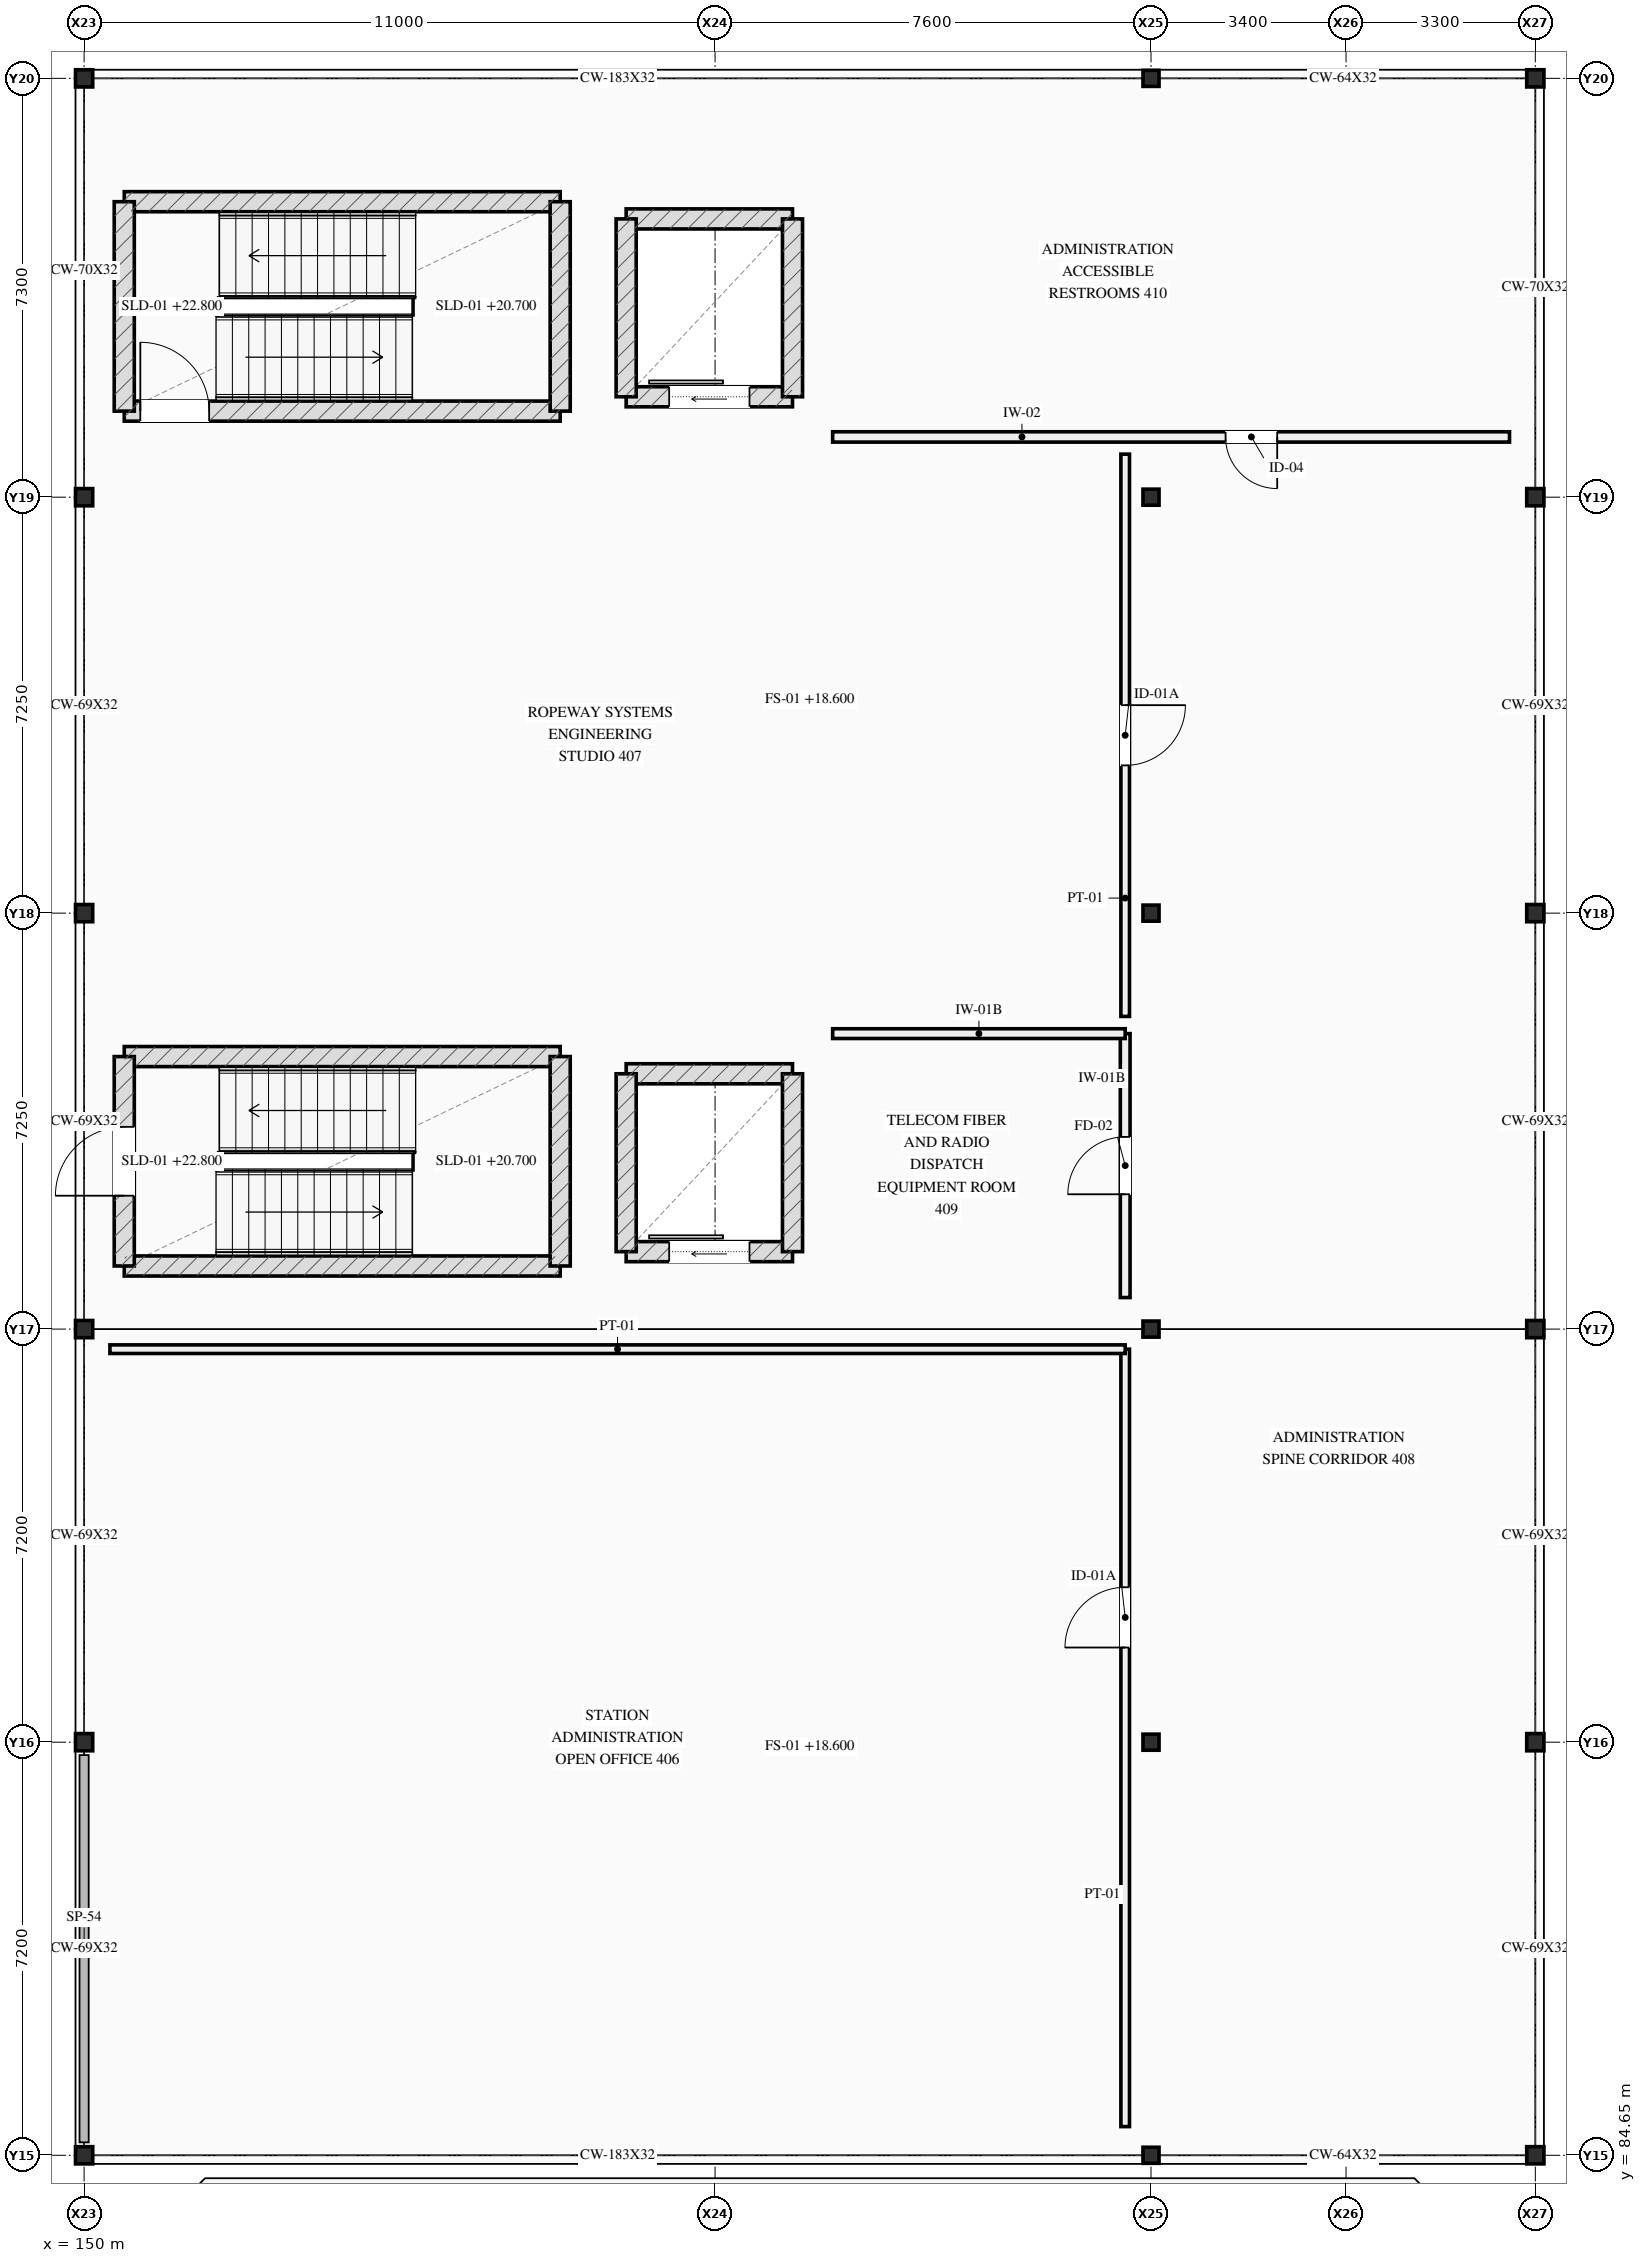
"""IFC4 building model, lengths in metres.
Left out: names, types, materials, properties, quantities, classifications, styles, units other than length and angle.
Written with IfcOpenShell. Run it as: python <this file> out.ifc"""

import sys

from ifc_helpers import new_model, si_unit, direction, frame, frame_2d, origin, origin_2d, place, context, subcontext, project, spatial, rectangle, hollow_rectangle, extrude, element, fill, save


model = new_model("IFC4")
c1 = context("Model", 3, precision=1e-05, world=origin(), true_north=direction((0.0, 1.0)))
c2 = subcontext(c1, "Body", "Model", "MODEL_VIEW")
j1 = project(units=[si_unit("LENGTHUNIT", "METRE"), si_unit("PLANEANGLEUNIT", "RADIAN")], contexts=[c1])
p1 = place(None, origin())
s1 = spatial("IfcSite", under=j1, at=p1, CompositionType="ELEMENT")
p2 = place(p1, origin())
s2 = spatial("IfcBuilding", under=s1, at=p2, CompositionType="ELEMENT")
p3 = place(p2, frame((0.0, 0.0, 18.6)))
s3 = spatial("IfcBuildingStorey", under=s2, at=p3, CompositionType="ELEMENT", Elevation=18.6)
for number, where, z_axis, x_axis in (
    (1, (150.0, 84.65, 0.0), (0.0, 0.0, 1.0), (1.0, 0.0, 0.0)),
    (2, (150.0, 91.85, 0.0), (0.0, 0.0, 1.0), (1.0, 0.0, 0.0)),
    (3, (150.0, 99.05, 0.0), (0.0, 0.0, 1.0), (1.0, 0.0, 0.0)),
    (4, (150.0, 106.3, 0.0), (0.0, 0.0, 1.0), (1.0, 0.0, 0.0)),
    (5, (150.0, 113.55, 0.0), (0.0, 0.0, 1.0), (1.0, 0.0, 0.0)),
    (6, (150.0, 120.85, 0.0), (0.0, 0.0, 1.0), (1.0, 0.0, 0.0)),
):
    element("IfcColumn", number, at=place(p3, frame(where, z_axis=z_axis, x_axis=x_axis)), inside=s3, PredefinedType="COLUMN", context=c2, shape_type="SweptSolid", body=[
        extrude(hollow_rectangle(XDim=0.3, YDim=0.3, WallThickness=0.013, at=origin_2d()), origin(), (0.0, 0.0, 1.0), 4.2),
    ])
for number, where, z_axis, x_axis in (
    (7, (168.6, 84.65, 0.0), (0.0, 0.0, 1.0), (1.0, 0.0, 0.0)),
    (8, (168.6, 91.85, 0.0), (0.0, 0.0, 1.0), (1.0, 0.0, 0.0)),
    (9, (168.6, 99.05, 0.0), (0.0, 0.0, 1.0), (1.0, 0.0, 0.0)),
    (10, (168.6, 106.3, 0.0), (0.0, 0.0, 1.0), (1.0, 0.0, 0.0)),
    (11, (168.6, 113.55, 0.0), (0.0, 0.0, 1.0), (1.0, 0.0, 0.0)),
    (12, (168.6, 120.85, 0.0), (0.0, 0.0, 1.0), (1.0, 0.0, 0.0)),
):
    element("IfcColumn", number, at=place(p3, frame(where, z_axis=z_axis, x_axis=x_axis)), inside=s3, PredefinedType="COLUMN", context=c2, shape_type="SweptSolid", body=[
        extrude(hollow_rectangle(XDim=0.28, YDim=0.28, WallThickness=0.01, at=origin_2d()), origin(), (0.0, 0.0, 1.0), 4.2),
    ])
for number, where, z_axis, x_axis in (
    (13, (175.3, 84.65, 0.0), (0.0, 0.0, 1.0), (1.0, 0.0, 0.0)),
    (14, (175.3, 91.85, 0.0), (0.0, 0.0, 1.0), (1.0, 0.0, 0.0)),
    (15, (175.3, 99.05, 0.0), (0.0, 0.0, 1.0), (1.0, 0.0, 0.0)),
    (16, (175.3, 106.3, 0.0), (0.0, 0.0, 1.0), (1.0, 0.0, 0.0)),
    (17, (175.3, 113.55, 0.0), (0.0, 0.0, 1.0), (1.0, 0.0, 0.0)),
    (18, (175.3, 120.85, 0.0), (0.0, 0.0, 1.0), (1.0, 0.0, 0.0)),
):
    element("IfcColumn", number, at=place(p3, frame(where, z_axis=z_axis, x_axis=x_axis)), inside=s3, PredefinedType="COLUMN", context=c2, shape_type="SweptSolid", body=[
        extrude(hollow_rectangle(XDim=0.3, YDim=0.3, WallThickness=0.013, at=origin_2d()), origin(), (0.0, 0.0, 1.0), 4.2),
    ])
for number, where, z_axis, x_axis in (
    (19, (150.7, 100.15, 0.0), (0.0, 0.0, 1.0), (1.0, 0.0, 0.0)),
    (20, (158.3, 103.8, 0.0), (0.0, 0.0, 1.0), (-1.0, 0.0, 0.0)),
):
    element("IfcWall", number, at=place(p3, frame(where, z_axis=z_axis, x_axis=x_axis)), inside=s3, PredefinedType="SHEAR", context=c2, shape_type="SweptSolid", body=[
        extrude(rectangle(XDim=7.6, YDim=0.35, at=frame_2d((3.8, 0.0))), origin(), (0.0, 0.0, 1.0), 3.99),
    ])
p4 = place(p3, frame((150.7, 103.8, 0.0), z_axis=(0.0, 0.0, 1.0), x_axis=(0.0, -1.0, 0.0)))
e21 = element("IfcWall", 21, at=p4, inside=s3, PredefinedType="SHEAR", context=c2, shape_type="SweptSolid", body=[
    extrude(rectangle(XDim=3.65, YDim=0.35, at=frame_2d((1.825, 0.0))), origin(), (0.0, 0.0, 1.0), 3.99),
])
p5 = place(p4, frame((1.225, 0.0, 0.0)))
e22 = element("IfcOpeningElement", 22, at=p5, cuts=e21, PredefinedType="OPENING", context=c2, shape_type="SweptSolid", body=[
    extrude(rectangle(XDim=1.2, YDim=2.2, at=frame_2d((0.6, 1.1))), frame((0.0, 0.185, 0.0), z_axis=(0.0, -1.0, 0.0), x_axis=(1.0, 0.0, 0.0)), (0.0, 0.0, 1.0), 0.37),
])
p6 = place(p3, frame((158.3, 100.15, 0.0), z_axis=(0.0, 0.0, 1.0), x_axis=(0.0, 1.0, 0.0)))
e23 = element("IfcWall", 23, at=p6, inside=s3, PredefinedType="SHEAR", context=c2, shape_type="SweptSolid", body=[
    extrude(rectangle(XDim=3.65, YDim=0.35, at=frame_2d((1.825, 0.0))), origin(), (0.0, 0.0, 1.0), 3.99),
])
p7 = place(p3, frame((159.45, 100.4, 0.0), z_axis=(0.0, 0.0, 1.0), x_axis=(1.0, 0.0, 0.0)))
e24 = element("IfcWall", 24, at=p7, inside=s3, PredefinedType="SHEAR", context=c2, shape_type="SweptSolid", body=[
    extrude(rectangle(XDim=2.9, YDim=0.35, at=frame_2d((1.45, 0.0))), origin(), (0.0, 0.0, 1.0), 3.99),
])
p8 = place(p7, frame((0.75, 0.0, 0.0)))
e25 = element("IfcOpeningElement", 25, at=p8, cuts=e24, PredefinedType="OPENING", context=c2, shape_type="SweptSolid", body=[
    extrude(rectangle(XDim=1.4, YDim=2.2, at=frame_2d((0.7, 1.1))), frame((0.0, 0.185, 0.0), z_axis=(0.0, -1.0, 0.0), x_axis=(1.0, 0.0, 0.0)), (0.0, 0.0, 1.0), 0.37),
])
p9 = place(p3, frame((159.45, 103.5, 0.0), z_axis=(0.0, 0.0, 1.0), x_axis=(1.0, 0.0, 0.0)))
e26 = element("IfcWall", 26, at=p9, inside=s3, PredefinedType="SHEAR", context=c2, shape_type="SweptSolid", body=[
    extrude(rectangle(XDim=2.9, YDim=0.35, at=frame_2d((1.45, 0.0))), origin(), (0.0, 0.0, 1.0), 3.99),
])
for number, where, z_axis, x_axis in (
    (27, (159.45, 100.4, 0.0), (0.0, 0.0, 1.0), (0.0, 1.0, 0.0)),
    (28, (162.35, 100.4, 0.0), (0.0, 0.0, 1.0), (0.0, 1.0, 0.0)),
):
    element("IfcWall", number, at=place(p3, frame(where, z_axis=z_axis, x_axis=x_axis)), inside=s3, PredefinedType="SHEAR", context=c2, shape_type="SweptSolid", body=[
        extrude(rectangle(XDim=3.1, YDim=0.35, at=frame_2d((1.55, 0.0))), origin(), (0.0, 0.0, 1.0), 3.99),
    ])
p10 = place(p3, frame((150.7, 115.05, 0.0), z_axis=(0.0, 0.0, 1.0), x_axis=(1.0, 0.0, 0.0)))
e29 = element("IfcWall", 29, at=p10, inside=s3, PredefinedType="SHEAR", context=c2, shape_type="SweptSolid", body=[
    extrude(rectangle(XDim=7.6, YDim=0.35, at=frame_2d((3.8, 0.0))), origin(), (0.0, 0.0, 1.0), 3.99),
])
p11 = place(p10, frame((0.28, 0.0, 0.0)))
e30 = element("IfcOpeningElement", 30, at=p11, cuts=e29, PredefinedType="OPENING", context=c2, shape_type="SweptSolid", body=[
    extrude(rectangle(XDim=1.2, YDim=2.2, at=frame_2d((0.6, 1.1))), frame((0.0, 0.185, 0.0), z_axis=(0.0, -1.0, 0.0), x_axis=(1.0, 0.0, 0.0)), (0.0, 0.0, 1.0), 0.37),
])
p12 = place(p3, frame((158.3, 118.7, 0.0), z_axis=(0.0, 0.0, 1.0), x_axis=(-1.0, 0.0, 0.0)))
e31 = element("IfcWall", 31, at=p12, inside=s3, PredefinedType="SHEAR", context=c2, shape_type="SweptSolid", body=[
    extrude(rectangle(XDim=7.6, YDim=0.35, at=frame_2d((3.8, 0.0))), origin(), (0.0, 0.0, 1.0), 3.99),
])
for number, where, z_axis, x_axis in (
    (32, (150.7, 118.7, 0.0), (0.0, 0.0, 1.0), (0.0, -1.0, 0.0)),
    (33, (158.3, 115.05, 0.0), (0.0, 0.0, 1.0), (0.0, 1.0, 0.0)),
):
    element("IfcWall", number, at=place(p3, frame(where, z_axis=z_axis, x_axis=x_axis)), inside=s3, PredefinedType="SHEAR", context=c2, shape_type="SweptSolid", body=[
        extrude(rectangle(XDim=3.65, YDim=0.35, at=frame_2d((1.825, 0.0))), origin(), (0.0, 0.0, 1.0), 3.99),
    ])
p13 = place(p3, frame((159.45, 115.3, 0.0), z_axis=(0.0, 0.0, 1.0), x_axis=(1.0, 0.0, 0.0)))
e34 = element("IfcWall", 34, at=p13, inside=s3, PredefinedType="SHEAR", context=c2, shape_type="SweptSolid", body=[
    extrude(rectangle(XDim=2.9, YDim=0.35, at=frame_2d((1.45, 0.0))), origin(), (0.0, 0.0, 1.0), 3.99),
])
p14 = place(p13, frame((0.75, 0.0, 0.0)))
e35 = element("IfcOpeningElement", 35, at=p14, cuts=e34, PredefinedType="OPENING", context=c2, shape_type="SweptSolid", body=[
    extrude(rectangle(XDim=1.4, YDim=2.2, at=frame_2d((0.7, 1.1))), frame((0.0, 0.185, 0.0), z_axis=(0.0, -1.0, 0.0), x_axis=(1.0, 0.0, 0.0)), (0.0, 0.0, 1.0), 0.37),
])
p15 = place(p3, frame((159.45, 118.4, 0.0), z_axis=(0.0, 0.0, 1.0), x_axis=(1.0, 0.0, 0.0)))
e36 = element("IfcWall", 36, at=p15, inside=s3, PredefinedType="SHEAR", context=c2, shape_type="SweptSolid", body=[
    extrude(rectangle(XDim=2.9, YDim=0.35, at=frame_2d((1.45, 0.0))), origin(), (0.0, 0.0, 1.0), 3.99),
])
for number, where, z_axis, x_axis in (
    (37, (159.45, 115.3, 0.0), (0.0, 0.0, 1.0), (0.0, 1.0, 0.0)),
    (38, (162.35, 115.3, 0.0), (0.0, 0.0, 1.0), (0.0, 1.0, 0.0)),
):
    element("IfcWall", number, at=place(p3, frame(where, z_axis=z_axis, x_axis=x_axis)), inside=s3, PredefinedType="SHEAR", context=c2, shape_type="SweptSolid", body=[
        extrude(rectangle(XDim=3.1, YDim=0.35, at=frame_2d((1.55, 0.0))), origin(), (0.0, 0.0, 1.0), 3.99),
    ])
p16 = place(p3, frame((168.15, 85.15, 0.0), z_axis=(0.0, 0.0, 1.0), x_axis=(0.0, 1.0, 0.0)))
e39 = element("IfcWall", 39, at=p16, inside=s3, PredefinedType="PARTITIONING", context=c2, shape_type="SweptSolid", body=[
    extrude(rectangle(XDim=13.55, YDim=0.15, at=frame_2d((6.775, 0.0))), origin(), (0.0, 0.0, 1.0), 3.05),
])
p17 = place(p16, frame((8.35, 0.0, 0.0)))
e40 = element("IfcOpeningElement", 40, at=p17, cuts=e39, PredefinedType="OPENING", context=c2, shape_type="SweptSolid", body=[
    extrude(rectangle(XDim=1.05, YDim=2.2, at=frame_2d((0.525, 1.1))), frame((0.0, 0.085, 0.0), z_axis=(0.0, -1.0, 0.0), x_axis=(1.0, 0.0, 0.0)), (0.0, 0.0, 1.0), 0.17),
])
p18 = place(p3, frame((150.45, 98.7, 0.0), z_axis=(0.0, 0.0, 1.0), x_axis=(1.0, 0.0, 0.0)))
e41 = element("IfcWall", 41, at=p18, inside=s3, PredefinedType="PARTITIONING", context=c2, shape_type="SweptSolid", body=[
    extrude(rectangle(XDim=17.7, YDim=0.15, at=frame_2d((8.85, 0.0))), origin(), (0.0, 0.0, 1.0), 3.05),
])
p19 = place(p3, frame((168.15, 104.5, 0.0), z_axis=(0.0, 0.0, 1.0), x_axis=(0.0, 1.0, 0.0)))
e42 = element("IfcWall", 42, at=p19, inside=s3, PredefinedType="PARTITIONING", context=c2, shape_type="SweptSolid", body=[
    extrude(rectangle(XDim=9.8, YDim=0.15, at=frame_2d((4.9, 0.0))), origin(), (0.0, 0.0, 1.0), 3.05),
])
p20 = place(p19, frame((4.375, 0.0, 0.0)))
e43 = element("IfcOpeningElement", 43, at=p20, cuts=e42, PredefinedType="OPENING", context=c2, shape_type="SweptSolid", body=[
    extrude(rectangle(XDim=1.05, YDim=2.2, at=frame_2d((0.525, 1.1))), frame((0.0, 0.085, 0.0), z_axis=(0.0, -1.0, 0.0), x_axis=(1.0, 0.0, 0.0)), (0.0, 0.0, 1.0), 0.17),
])
p21 = place(p3, frame((168.15, 99.6, 0.0), z_axis=(0.0, 0.0, 1.0), x_axis=(0.0, 1.0, 0.0)))
e44 = element("IfcWall", 44, at=p21, inside=s3, PredefinedType="SOLIDWALL", context=c2, shape_type="SweptSolid", body=[
    extrude(rectangle(XDim=4.6, YDim=0.17, at=frame_2d((2.3, 0.0))), origin(), (0.0, 0.0, 1.0), 3.05),
])
p22 = place(p21, frame((1.8, 0.0, 0.0)))
e45 = element("IfcOpeningElement", 45, at=p22, cuts=e44, PredefinedType="OPENING", context=c2, shape_type="SweptSolid", body=[
    extrude(rectangle(XDim=1.0, YDim=2.15, at=frame_2d((0.5, 1.075))), frame((0.0, 0.095, 0.0), z_axis=(0.0, -1.0, 0.0), x_axis=(1.0, 0.0, 0.0)), (0.0, 0.0, 1.0), 0.19),
])
p23 = place(p3, frame((163.05, 104.2, 0.0), z_axis=(0.0, 0.0, 1.0), x_axis=(1.0, 0.0, 0.0)))
e46 = element("IfcWall", 46, at=p23, inside=s3, PredefinedType="SOLIDWALL", context=c2, shape_type="SweptSolid", body=[
    extrude(rectangle(XDim=5.1, YDim=0.17, at=frame_2d((2.55, 0.0))), origin(), (0.0, 0.0, 1.0), 3.05),
])
p24 = place(p3, frame((163.05, 114.6, 0.0), z_axis=(0.0, 0.0, 1.0), x_axis=(1.0, 0.0, 0.0)))
e47 = element("IfcWall", 47, at=p24, inside=s3, PredefinedType="PLUMBINGWALL", context=c2, shape_type="SweptSolid", body=[
    extrude(rectangle(XDim=11.8, YDim=0.18, at=frame_2d((5.9, 0.0))), origin(), (0.0, 0.0, 1.0), 3.05),
])
p25 = place(p24, frame((6.85, 0.0, 0.0)))
e48 = element("IfcOpeningElement", 48, at=p25, cuts=e47, PredefinedType="OPENING", context=c2, shape_type="SweptSolid", body=[
    extrude(rectangle(XDim=0.9, YDim=2.1, at=frame_2d((0.45, 1.05))), frame((0.0, 0.1, 0.0), z_axis=(0.0, -1.0, 0.0), x_axis=(1.0, 0.0, 0.0)), (0.0, 0.0, 1.0), 0.2),
])
p26 = place(p5, origin())
e49 = element("IfcDoor", 49, at=p26, inside=s3, OperationType="SINGLE_SWING_RIGHT", PredefinedType="DOOR", context=c2, shape_type="SweptSolid", body=[
    extrude(rectangle(XDim=1.2, YDim=2.2, at=frame_2d((0.6, 1.1))), frame((0.0, 0.025, 0.0), z_axis=(0.0, -1.0, 0.0), x_axis=(1.0, 0.0, 0.0)), (0.0, 0.0, 1.0), 0.05),
])
fill(e22, e49)
p27 = place(p8, origin())
e50 = element("IfcDoor", 50, at=p27, inside=s3, OperationType="SLIDING_TO_LEFT", PredefinedType="DOOR", context=c2, shape_type="SweptSolid", body=[
    extrude(rectangle(XDim=1.4, YDim=2.2, at=frame_2d((0.7, 1.1))), frame((0.0, 0.025, 0.0), z_axis=(0.0, -1.0, 0.0), x_axis=(1.0, 0.0, 0.0)), (0.0, 0.0, 1.0), 0.05),
])
fill(e25, e50)
p28 = place(p11, origin())
e51 = element("IfcDoor", 51, at=p28, inside=s3, OperationType="SINGLE_SWING_LEFT", PredefinedType="DOOR", context=c2, shape_type="SweptSolid", body=[
    extrude(rectangle(XDim=1.2, YDim=2.2, at=frame_2d((0.6, 1.1))), frame((0.0, 0.025, 0.0), z_axis=(0.0, -1.0, 0.0), x_axis=(1.0, 0.0, 0.0)), (0.0, 0.0, 1.0), 0.05),
])
fill(e30, e51)
p29 = place(p14, origin())
e52 = element("IfcDoor", 52, at=p29, inside=s3, OperationType="SLIDING_TO_LEFT", PredefinedType="DOOR", context=c2, shape_type="SweptSolid", body=[
    extrude(rectangle(XDim=1.4, YDim=2.2, at=frame_2d((0.7, 1.1))), frame((0.0, 0.025, 0.0), z_axis=(0.0, -1.0, 0.0), x_axis=(1.0, 0.0, 0.0)), (0.0, 0.0, 1.0), 0.05),
])
fill(e35, e52)
p30 = place(p17, origin())
e53 = element("IfcDoor", 53, at=p30, inside=s3, OperationType="SINGLE_SWING_LEFT", PredefinedType="DOOR", context=c2, shape_type="SweptSolid", body=[
    extrude(rectangle(XDim=1.05, YDim=2.2, at=frame_2d((0.525, 1.1))), frame((0.0, 0.025, 0.0), z_axis=(0.0, -1.0, 0.0), x_axis=(1.0, 0.0, 0.0)), (0.0, 0.0, 1.0), 0.05),
])
fill(e40, e53)
p31 = place(p20, origin())
e54 = element("IfcDoor", 54, at=p31, inside=s3, OperationType="SINGLE_SWING_RIGHT", PredefinedType="DOOR", context=c2, shape_type="SweptSolid", body=[
    extrude(rectangle(XDim=1.05, YDim=2.2, at=frame_2d((0.525, 1.1))), frame((0.0, 0.025, 0.0), z_axis=(0.0, -1.0, 0.0), x_axis=(1.0, 0.0, 0.0)), (0.0, 0.0, 1.0), 0.05),
])
fill(e43, e54)
p32 = place(p22, origin())
e55 = element("IfcDoor", 55, at=p32, inside=s3, OperationType="SINGLE_SWING_LEFT", PredefinedType="DOOR", context=c2, shape_type="SweptSolid", body=[
    extrude(rectangle(XDim=1.0, YDim=2.15, at=frame_2d((0.5, 1.075))), frame((0.0, 0.025, 0.0), z_axis=(0.0, -1.0, 0.0), x_axis=(1.0, 0.0, 0.0)), (0.0, 0.0, 1.0), 0.05),
])
fill(e45, e55)
p33 = place(p25, origin())
e56 = element("IfcDoor", 56, at=p33, inside=s3, OperationType="SINGLE_SWING_RIGHT", PredefinedType="DOOR", context=c2, shape_type="SweptSolid", body=[
    extrude(rectangle(XDim=0.9, YDim=2.1, at=frame_2d((0.45, 1.05))), frame((0.0, 0.025, 0.0), z_axis=(0.0, -1.0, 0.0), x_axis=(1.0, 0.0, 0.0)), (0.0, 0.0, 1.0), 0.05),
])
fill(e48, e56)
save(model, sys.argv[1])
